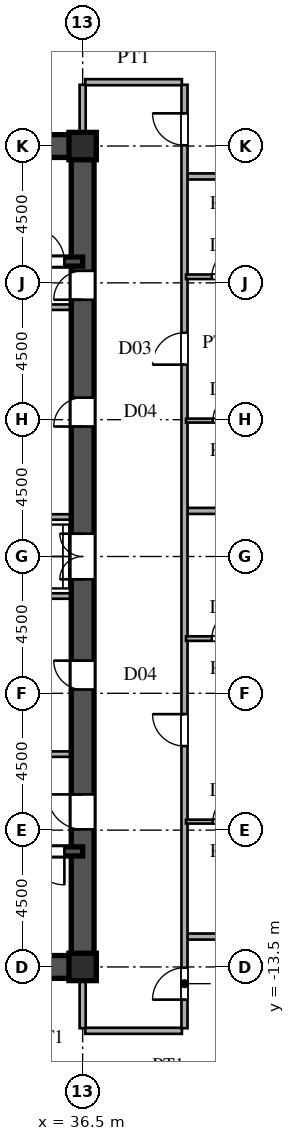
"""IFC4 building model, lengths in metres.
Left out: names, types, materials, properties, quantities, classifications, styles, units other than length and angle.
Written with IfcOpenShell. Run it as: python <this file> out.ifc"""

import sys

from ifc_helpers import new_model, si_unit, direction, frame, frame_2d, origin, origin_2d, place, context, subcontext, project, spatial, rectangle, i_section, extrude, source, transform, mapped, element, fill, save


model = new_model("IFC4")
c1 = context("Model", 3, precision=1e-05, world=origin(), true_north=direction((0.0, 1.0)))
c2 = subcontext(c1, "Body", "Model", "MODEL_VIEW")
j1 = project(units=[si_unit("LENGTHUNIT", "METRE"), si_unit("PLANEANGLEUNIT", "RADIAN")], contexts=[c1])
p1 = place(None, origin())
s1 = spatial("IfcSite", under=j1, at=p1, CompositionType="ELEMENT")
p2 = place(p1, origin())
s2 = spatial("IfcBuilding", under=s1, at=p2, CompositionType="ELEMENT")
p3 = place(p2, frame((0.0, 0.0, 44.1)))
s3 = spatial("IfcBuildingStorey", under=s2, at=p3, CompositionType="ELEMENT", Elevation=44.1)
m1 = source(origin(), c2, "Body", "SweptSolid", [
    extrude(i_section(OverallWidth=0.9, OverallDepth=0.9, WebThickness=0.036, FlangeThickness=0.055, at=origin_2d()), origin(), (0.0, 0.0, 1.0), 3.6),
])
for number, where, z_axis, x_axis in (
    (1, (36.5, -13.5, 0.0), (0.0, 0.0, 1.0), (1.0, 0.0, 0.0)),
    (2, (36.5, 13.5, 0.0), (0.0, 0.0, 1.0), (1.0, 0.0, 0.0)),
):
    element("IfcColumn", number, at=place(p3, frame(where, z_axis=z_axis, x_axis=x_axis)), inside=s3, PredefinedType="COLUMN", context=c2, shape_type="MappedRepresentation", body=[
        mapped(m1, transform((0.0, 0.0, 0.0), scale=1.0)),
    ])
for number, where, z_axis, x_axis in (
    (3, (27.5, -13.5, 0.0), (0.0, 0.0, 1.0), (1.0, 0.0, 0.0)),
    (4, (27.5, 13.5, 0.0), (0.0, 0.0, 1.0), (1.0, 0.0, 0.0)),
):
    element("IfcWall", number, at=place(p3, frame(where, z_axis=z_axis, x_axis=x_axis)), inside=s3, PredefinedType="SHEAR", context=c2, shape_type="SweptSolid", body=[
        extrude(rectangle(XDim=9.0, YDim=0.75, at=frame_2d((4.5, 0.0))), origin(), (0.0, 0.0, 1.0), 3.38),
    ])
p4 = place(p3, frame((36.5, -13.65, 0.0), z_axis=(0.0, 0.0, 1.0), x_axis=(0.0, 1.0, 0.0)))
e5 = element("IfcWall", 5, at=p4, inside=s3, PredefinedType="SHEAR", context=c2, shape_type="SweptSolid", body=[
    extrude(rectangle(XDim=7.15, YDim=0.75, at=frame_2d((3.575, 0.0))), origin(), (0.0, 0.0, 1.0), 3.38),
])
p5 = place(p4, frame((4.675, 0.0, 0.0)))
e6 = element("IfcOpeningElement", 6, at=p5, cuts=e5, PredefinedType="OPENING", context=c2, shape_type="SweptSolid", body=[
    extrude(rectangle(XDim=1.15, YDim=2.2, at=frame_2d((0.575, 1.1))), frame((0.0, 0.385, 0.0), z_axis=(0.0, -1.0, 0.0), x_axis=(1.0, 0.0, 0.0)), (0.0, 0.0, 1.0), 0.77),
])
p6 = place(p3, frame((36.5, -1.3, 0.0), z_axis=(0.0, 0.0, 1.0), x_axis=(0.0, 1.0, 0.0)))
e7 = element("IfcWall", 7, at=p6, inside=s3, PredefinedType="SHEAR", context=c2, shape_type="SweptSolid", body=[
    extrude(rectangle(XDim=2.6, YDim=0.75, at=frame_2d((1.3, 0.0))), origin(), (0.0, 0.0, 1.0), 3.38),
])
p7 = place(p6, frame((0.55, 0.0, 0.0)))
e8 = element("IfcOpeningElement", 8, at=p7, cuts=e7, PredefinedType="OPENING", context=c2, shape_type="SweptSolid", body=[
    extrude(rectangle(XDim=1.5, YDim=2.3, at=frame_2d((0.75, 1.15))), frame((0.0, 0.385, 0.0), z_axis=(0.0, -1.0, 0.0), x_axis=(1.0, 0.0, 0.0)), (0.0, 0.0, 1.0), 0.77),
])
p8 = place(p3, frame((36.5, 8.2, 0.0), z_axis=(0.0, 0.0, 1.0), x_axis=(0.0, 1.0, 0.0)))
e9 = element("IfcWall", 9, at=p8, inside=s3, PredefinedType="SHEAR", context=c2, shape_type="SweptSolid", body=[
    extrude(rectangle(XDim=5.45, YDim=0.75, at=frame_2d((2.725, 0.0))), origin(), (0.0, 0.0, 1.0), 3.38),
])
p9 = place(p8, frame((0.245, 0.0, 0.0)))
e10 = element("IfcOpeningElement", 10, at=p9, cuts=e9, PredefinedType="OPENING", context=c2, shape_type="SweptSolid", body=[
    extrude(rectangle(XDim=0.95, YDim=2.15, at=frame_2d((0.475, 1.075))), frame((0.0, 0.385, 0.0), z_axis=(0.0, -1.0, 0.0), x_axis=(1.0, 0.0, 0.0)), (0.0, 0.0, 1.0), 0.77),
])
p10 = place(p3, frame((36.5, -6.5, 0.0), z_axis=(0.0, 0.0, 1.0), x_axis=(0.0, 1.0, 0.0)))
e11 = element("IfcWall", 11, at=p10, inside=s3, PredefinedType="SHEAR", context=c2, shape_type="SweptSolid", body=[
    extrude(rectangle(XDim=5.2, YDim=0.75, at=frame_2d((2.6, 0.0))), origin(), (0.0, 0.0, 1.0), 3.38),
])
p11 = place(p10, frame((2.125, 0.0, 0.0)))
e12 = element("IfcOpeningElement", 12, at=p11, cuts=e11, PredefinedType="OPENING", context=c2, shape_type="SweptSolid", body=[
    extrude(rectangle(XDim=0.95, YDim=2.15, at=frame_2d((0.475, 1.075))), frame((0.0, 0.385, 0.0), z_axis=(0.0, -1.0, 0.0), x_axis=(1.0, 0.0, 0.0)), (0.0, 0.0, 1.0), 0.77),
])
p12 = place(p3, frame((36.5, 1.3, 0.0), z_axis=(0.0, 0.0, 1.0), x_axis=(0.0, 1.0, 0.0)))
e13 = element("IfcWall", 13, at=p12, inside=s3, PredefinedType="SHEAR", context=c2, shape_type="SweptSolid", body=[
    extrude(rectangle(XDim=6.9, YDim=0.75, at=frame_2d((3.45, 0.0))), origin(), (0.0, 0.0, 1.0), 3.38),
])
p13 = place(p12, frame((2.975, 0.0, 0.0)))
e14 = element("IfcOpeningElement", 14, at=p13, cuts=e13, PredefinedType="OPENING", context=c2, shape_type="SweptSolid", body=[
    extrude(rectangle(XDim=0.95, YDim=2.15, at=frame_2d((0.475, 1.075))), frame((0.0, 0.385, 0.0), z_axis=(0.0, -1.0, 0.0), x_axis=(1.0, 0.0, 0.0)), (0.0, 0.0, 1.0), 0.77),
])
p14 = place(p3, frame((27.5, -9.7, 0.0), z_axis=(0.0, 0.0, 1.0), x_axis=(1.0, 0.0, 0.0)))
e15 = element("IfcWall", 15, at=p14, inside=s3, PredefinedType="SHEAR", context=c2, shape_type="SweptSolid", body=[
    extrude(rectangle(XDim=9.0, YDim=0.3, at=frame_2d((4.5, 0.0))), origin(), (0.0, 0.0, 1.0), 3.38),
])
p15 = place(p14, frame((7.3, 0.0, 0.0)))
e16 = element("IfcOpeningElement", 16, at=p15, cuts=e15, PredefinedType="OPENING", context=c2, shape_type="SweptSolid", body=[
    extrude(rectangle(XDim=1.1, YDim=2.2, at=frame_2d((0.55, 1.1))), frame((0.0, 0.16, 0.0), z_axis=(0.0, -1.0, 0.0), x_axis=(1.0, 0.0, 0.0)), (0.0, 0.0, 1.0), 0.32),
])
p16 = place(p3, frame((27.5, 9.7, 0.0), z_axis=(0.0, 0.0, 1.0), x_axis=(1.0, 0.0, 0.0)))
e17 = element("IfcWall", 17, at=p16, inside=s3, PredefinedType="SHEAR", context=c2, shape_type="SweptSolid", body=[
    extrude(rectangle(XDim=9.0, YDim=0.3, at=frame_2d((4.5, 0.0))), origin(), (0.0, 0.0, 1.0), 3.38),
])
p17 = place(p16, frame((7.3, 0.0, 0.0)))
e18 = element("IfcOpeningElement", 18, at=p17, cuts=e17, PredefinedType="OPENING", context=c2, shape_type="SweptSolid", body=[
    extrude(rectangle(XDim=1.1, YDim=2.2, at=frame_2d((0.55, 1.1))), frame((0.0, 0.16, 0.0), z_axis=(0.0, -1.0, 0.0), x_axis=(1.0, 0.0, 0.0)), (0.0, 0.0, 1.0), 0.32),
])
for number, where, z_axis, x_axis in (
    (19, (30.45, -6.5, 0.0), (0.0, 0.0, 1.0), (1.0, 0.0, 0.0)),
    (20, (30.45, 8.2, 0.0), (0.0, 0.0, 1.0), (1.0, 0.0, 0.0)),
):
    element("IfcWall", number, at=place(p3, frame(where, z_axis=z_axis, x_axis=x_axis)), inside=s3, PredefinedType="PARTITIONING", context=c2, shape_type="SweptSolid", body=[
        extrude(rectangle(XDim=5.7, YDim=0.18, at=frame_2d((2.85, 0.0))), origin(), (0.0, 0.0, 1.0), 3.38),
    ])
for number, where, z_axis, x_axis in (
    (21, (33.2, -1.3, 0.0), (0.0, 0.0, 1.0), (1.0, 0.0, 0.0)),
    (22, (33.2, 1.3, 0.0), (0.0, 0.0, 1.0), (1.0, 0.0, 0.0)),
):
    element("IfcWall", number, at=place(p3, frame(where, z_axis=z_axis, x_axis=x_axis)), inside=s3, PredefinedType="PARTITIONING", context=c2, shape_type="SweptSolid", body=[
        extrude(rectangle(XDim=2.95, YDim=0.18, at=frame_2d((1.475, 0.0))), origin(), (0.0, 0.0, 1.0), 3.38),
    ])
p18 = place(p3, frame((36.585, -15.6, 0.0), z_axis=(0.0, 0.0, 1.0), x_axis=(1.0, 0.0, 0.0)))
e23 = element("IfcWall", 23, at=p18, inside=s3, PredefinedType="PARTITIONING", context=c2, shape_type="SweptSolid", body=[
    extrude(rectangle(XDim=3.18, YDim=0.2, at=frame_2d((1.59, 0.0))), origin(), (0.0, 0.0, 1.0), 3.38),
])
p19 = place(p3, frame((39.93, -12.5, 0.0), z_axis=(0.0, 0.0, 1.0), x_axis=(1.0, 0.0, 0.0)))
e24 = element("IfcWall", 24, at=p19, inside=s3, PredefinedType="PARTITIONING", context=c2, shape_type="SweptSolid", body=[
    extrude(rectangle(XDim=26.407, YDim=0.2, at=frame_2d((13.204, 0.0))), origin(), (0.0, 0.0, 1.0), 3.38),
])
p20 = place(p3, frame((39.9, -8.72, 0.0), z_axis=(0.0, 0.0, 1.0), x_axis=(1.0, 0.0, 0.0)))
e25 = element("IfcWall", 25, at=p20, inside=s3, PredefinedType="PARTITIONING", context=c2, shape_type="SweptSolid", body=[
    extrude(rectangle(XDim=2.65, YDim=0.13, at=frame_2d((1.325, 0.0))), origin(), (0.0, 0.0, 1.0), 3.38),
])
p21 = place(p20, frame((0.885, 0.0, 0.0)))
e26 = element("IfcOpeningElement", 26, at=p21, cuts=e25, PredefinedType="OPENING", context=c2, shape_type="SweptSolid", body=[
    extrude(rectangle(XDim=0.88, YDim=2.1, at=frame_2d((0.44, 1.05))), frame((0.0, 0.075, 0.0), z_axis=(0.0, -1.0, 0.0), x_axis=(1.0, 0.0, 0.0)), (0.0, 0.0, 1.0), 0.15),
])
p22 = place(p3, frame((39.9, -2.7, 0.0), z_axis=(0.0, 0.0, 1.0), x_axis=(1.0, 0.0, 0.0)))
e27 = element("IfcWall", 27, at=p22, inside=s3, PredefinedType="PARTITIONING", context=c2, shape_type="SweptSolid", body=[
    extrude(rectangle(XDim=2.65, YDim=0.15, at=frame_2d((1.325, 0.0))), origin(), (0.0, 0.0, 1.0), 3.38),
])
p23 = place(p22, frame((0.85, 0.0, 0.0)))
e28 = element("IfcOpeningElement", 28, at=p23, cuts=e27, PredefinedType="OPENING", context=c2, shape_type="SweptSolid", body=[
    extrude(rectangle(XDim=0.95, YDim=2.15, at=frame_2d((0.475, 1.075))), frame((0.0, 0.085, 0.0), z_axis=(0.0, -1.0, 0.0), x_axis=(1.0, 0.0, 0.0)), (0.0, 0.0, 1.0), 0.17),
])
p24 = place(p3, frame((39.93, 1.5, 0.0), z_axis=(0.0, 0.0, 1.0), x_axis=(1.0, 0.0, 0.0)))
e29 = element("IfcWall", 29, at=p24, inside=s3, PredefinedType="PARTITIONING", context=c2, shape_type="SweptSolid", body=[
    extrude(rectangle(XDim=32.575, YDim=0.2, at=frame_2d((16.288, 0.0))), origin(), (0.0, 0.0, 1.0), 3.38),
])
p25 = place(p3, frame((39.9, 4.47, 0.0), z_axis=(0.0, 0.0, 1.0), x_axis=(1.0, 0.0, 0.0)))
e30 = element("IfcWall", 30, at=p25, inside=s3, PredefinedType="PARTITIONING", context=c2, shape_type="SweptSolid", body=[
    extrude(rectangle(XDim=2.65, YDim=0.13, at=frame_2d((1.325, 0.0))), origin(), (0.0, 0.0, 1.0), 2.68),
])
p26 = place(p25, frame((0.885, 0.0, 0.0)))
e31 = element("IfcOpeningElement", 31, at=p26, cuts=e30, PredefinedType="OPENING", context=c2, shape_type="SweptSolid", body=[
    extrude(rectangle(XDim=0.88, YDim=2.1, at=frame_2d((0.44, 1.05))), frame((0.0, 0.075, 0.0), z_axis=(0.0, -1.0, 0.0), x_axis=(1.0, 0.0, 0.0)), (0.0, 0.0, 1.0), 0.15),
])
p27 = place(p3, frame((39.9, 9.2, 0.0), z_axis=(0.0, 0.0, 1.0), x_axis=(1.0, 0.0, 0.0)))
e32 = element("IfcWall", 32, at=p27, inside=s3, PredefinedType="PARTITIONING", context=c2, shape_type="SweptSolid", body=[
    extrude(rectangle(XDim=2.65, YDim=0.15, at=frame_2d((1.325, 0.0))), origin(), (0.0, 0.0, 1.0), 3.38),
])
p28 = place(p27, frame((0.85, 0.0, 0.0)))
e33 = element("IfcOpeningElement", 33, at=p28, cuts=e32, PredefinedType="OPENING", context=c2, shape_type="SweptSolid", body=[
    extrude(rectangle(XDim=0.95, YDim=2.15, at=frame_2d((0.475, 1.075))), frame((0.0, 0.085, 0.0), z_axis=(0.0, -1.0, 0.0), x_axis=(1.0, 0.0, 0.0)), (0.0, 0.0, 1.0), 0.17),
])
p29 = place(p3, frame((39.93, 12.5, 0.0), z_axis=(0.0, 0.0, 1.0), x_axis=(1.0, 0.0, 0.0)))
e34 = element("IfcWall", 34, at=p29, inside=s3, PredefinedType="PARTITIONING", context=c2, shape_type="SweptSolid", body=[
    extrude(rectangle(XDim=26.407, YDim=0.2, at=frame_2d((13.204, 0.0))), origin(), (0.0, 0.0, 1.0), 3.38),
])
p30 = place(p3, frame((36.585, 15.6, 0.0), z_axis=(0.0, 0.0, 1.0), x_axis=(1.0, 0.0, 0.0)))
e35 = element("IfcWall", 35, at=p30, inside=s3, PredefinedType="PARTITIONING", context=c2, shape_type="SweptSolid", body=[
    extrude(rectangle(XDim=3.18, YDim=0.2, at=frame_2d((1.59, 0.0))), origin(), (0.0, 0.0, 1.0), 3.38),
])
for number, where, z_axis, x_axis in (
    (36, (36.5, -15.515, 0.0), (0.0, 0.0, 1.0), (0.0, 1.0, 0.0)),
    (37, (36.5, 13.88, 0.0), (0.0, 0.0, 1.0), (0.0, 1.0, 0.0)),
):
    element("IfcWall", number, at=place(p3, frame(where, z_axis=z_axis, x_axis=x_axis)), inside=s3, PredefinedType="PARTITIONING", context=c2, shape_type="SweptSolid", body=[
        extrude(rectangle(XDim=1.635, YDim=0.2, at=frame_2d((0.817, 0.0))), origin(), (0.0, 0.0, 1.0), 2.68),
    ])
p31 = place(p3, frame((39.85, -15.515, 0.0), z_axis=(0.0, 0.0, 1.0), x_axis=(0.0, 1.0, 0.0)))
e38 = element("IfcWall", 38, at=p31, inside=s3, PredefinedType="PARTITIONING", context=c2, shape_type="SweptSolid", body=[
    extrude(rectangle(XDim=31.03, YDim=0.2, at=frame_2d((15.515, 0.0))), origin(), (0.0, 0.0, 1.0), 3.38),
])
p32 = place(p31, frame((0.94, 0.0, 0.0)))
e39 = element("IfcOpeningElement", 39, at=p32, cuts=e38, PredefinedType="OPENING", context=c2, shape_type="SweptSolid", body=[
    extrude(rectangle(XDim=1.05, YDim=2.25, at=frame_2d((0.525, 1.125))), frame((0.0, 0.11, 0.0), z_axis=(0.0, -1.0, 0.0), x_axis=(1.0, 0.0, 0.0)), (0.0, 0.0, 1.0), 0.22),
])
p33 = place(p31, frame((9.28, 0.0, 0.0)))
e40 = element("IfcOpeningElement", 40, at=p33, cuts=e38, PredefinedType="OPENING", context=c2, shape_type="SweptSolid", body=[
    extrude(rectangle(XDim=1.05, YDim=2.25, at=frame_2d((0.525, 1.125))), frame((0.0, 0.11, 0.0), z_axis=(0.0, -1.0, 0.0), x_axis=(1.0, 0.0, 0.0)), (0.0, 0.0, 1.0), 0.22),
])
p34 = place(p31, frame((21.825, 0.0, 0.0)))
e41 = element("IfcOpeningElement", 41, at=p34, cuts=e38, PredefinedType="OPENING", context=c2, shape_type="SweptSolid", body=[
    extrude(rectangle(XDim=1.05, YDim=2.25, at=frame_2d((0.525, 1.125))), frame((0.0, 0.11, 0.0), z_axis=(0.0, -1.0, 0.0), x_axis=(1.0, 0.0, 0.0)), (0.0, 0.0, 1.0), 0.22),
])
p35 = place(p31, frame((29.04, 0.0, 0.0)))
e42 = element("IfcOpeningElement", 42, at=p35, cuts=e38, PredefinedType="OPENING", context=c2, shape_type="SweptSolid", body=[
    extrude(rectangle(XDim=1.05, YDim=2.25, at=frame_2d((0.525, 1.125))), frame((0.0, 0.11, 0.0), z_axis=(0.0, -1.0, 0.0), x_axis=(1.0, 0.0, 0.0)), (0.0, 0.0, 1.0), 0.22),
])
m2 = source(origin(), c2, "Body", "SweptSolid", [
    extrude(rectangle(XDim=1.15, YDim=2.2, at=frame_2d((0.575, 1.1))), frame((0.0, 0.025, 0.0), z_axis=(0.0, -1.0, 0.0), x_axis=(1.0, 0.0, 0.0)), (0.0, 0.0, 1.0), 0.05),
])
p36 = place(p5, origin())
e43 = element("IfcDoor", 43, at=p36, inside=s3, OperationType="SINGLE_SWING_RIGHT", PredefinedType="DOOR", context=c2, shape_type="MappedRepresentation", body=[
    mapped(m2, transform((0.0, 0.0, 0.0), scale=1.0)),
])
fill(e6, e43)
m3 = source(origin(), c2, "Body", "SweptSolid", [
    extrude(rectangle(XDim=1.5, YDim=2.3, at=frame_2d((0.75, 1.15))), frame((0.0, 0.025, 0.0), z_axis=(0.0, -1.0, 0.0), x_axis=(1.0, 0.0, 0.0)), (0.0, 0.0, 1.0), 0.05),
])
p37 = place(p7, origin())
e44 = element("IfcDoor", 44, at=p37, inside=s3, OperationType="DOUBLE_SWING_LEFT", PredefinedType="DOOR", context=c2, shape_type="MappedRepresentation", body=[
    mapped(m3, transform((0.0, 0.0, 0.0), scale=1.0)),
])
fill(e8, e44)
m4 = source(origin(), c2, "Body", "SweptSolid", [
    extrude(rectangle(XDim=0.95, YDim=2.15, at=frame_2d((0.475, 1.075))), frame((0.0, 0.025, 0.0), z_axis=(0.0, -1.0, 0.0), x_axis=(1.0, 0.0, 0.0)), (0.0, 0.0, 1.0), 0.05),
])
p38 = place(p9, origin())
e45 = element("IfcDoor", 45, at=p38, inside=s3, OperationType="SINGLE_SWING_LEFT", PredefinedType="DOOR", context=c2, shape_type="MappedRepresentation", body=[
    mapped(m4, transform((0.0, 0.0, 0.0), scale=1.0)),
])
fill(e10, e45)
p39 = place(p11, origin())
e46 = element("IfcDoor", 46, at=p39, inside=s3, OperationType="SINGLE_SWING_RIGHT", PredefinedType="DOOR", context=c2, shape_type="MappedRepresentation", body=[
    mapped(m4, transform((0.0, 0.0, 0.0), scale=1.0)),
])
fill(e12, e46)
p40 = place(p13, origin())
e47 = element("IfcDoor", 47, at=p40, inside=s3, OperationType="SINGLE_SWING_LEFT", PredefinedType="DOOR", context=c2, shape_type="MappedRepresentation", body=[
    mapped(m4, transform((0.0, 0.0, 0.0), scale=1.0)),
])
fill(e14, e47)
m5 = source(origin(), c2, "Body", "SweptSolid", [
    extrude(rectangle(XDim=1.1, YDim=2.2, at=frame_2d((0.55, 1.1))), frame((0.0, 0.025, 0.0), z_axis=(0.0, -1.0, 0.0), x_axis=(1.0, 0.0, 0.0)), (0.0, 0.0, 1.0), 0.05),
])
p41 = place(p15, frame((1.1, 0.0, 0.0), z_axis=(0.0, 0.0, 1.0), x_axis=(-1.0, 0.0, 0.0)))
e48 = element("IfcDoor", 48, at=p41, inside=s3, OperationType="SINGLE_SWING_RIGHT", PredefinedType="DOOR", context=c2, shape_type="MappedRepresentation", body=[
    mapped(m5, transform((0.0, 0.0, 0.0), scale=1.0)),
])
fill(e16, e48)
p42 = place(p17, origin())
e49 = element("IfcDoor", 49, at=p42, inside=s3, OperationType="SINGLE_SWING_LEFT", PredefinedType="DOOR", context=c2, shape_type="MappedRepresentation", body=[
    mapped(m5, transform((0.0, 0.0, 0.0), scale=1.0)),
])
fill(e18, e49)
m6 = source(origin(), c2, "Body", "SweptSolid", [
    extrude(rectangle(XDim=0.88, YDim=2.1, at=frame_2d((0.44, 1.05))), frame((0.0, 0.025, 0.0), z_axis=(0.0, -1.0, 0.0), x_axis=(1.0, 0.0, 0.0)), (0.0, 0.0, 1.0), 0.05),
])
p43 = place(p21, origin())
e50 = element("IfcDoor", 50, at=p43, inside=s3, OperationType="SINGLE_SWING_RIGHT", PredefinedType="DOOR", context=c2, shape_type="MappedRepresentation", body=[
    mapped(m6, transform((0.0, 0.0, 0.0), scale=1.0)),
])
fill(e26, e50)
m7 = source(origin(), c2, "Body", "SweptSolid", [
    extrude(rectangle(XDim=0.95, YDim=2.15, at=frame_2d((0.475, 1.075))), frame((0.0, 0.025, 0.0), z_axis=(0.0, -1.0, 0.0), x_axis=(1.0, 0.0, 0.0)), (0.0, 0.0, 1.0), 0.05),
])
p44 = place(p23, origin())
e51 = element("IfcDoor", 51, at=p44, inside=s3, OperationType="SINGLE_SWING_RIGHT", PredefinedType="DOOR", context=c2, shape_type="MappedRepresentation", body=[
    mapped(m7, transform((0.0, 0.0, 0.0), scale=1.0)),
])
fill(e28, e51)
p45 = place(p26, origin())
e52 = element("IfcDoor", 52, at=p45, inside=s3, OperationType="SINGLE_SWING_RIGHT", PredefinedType="DOOR", context=c2, shape_type="MappedRepresentation", body=[
    mapped(m6, transform((0.0, 0.0, 0.0), scale=1.0)),
])
fill(e31, e52)
p46 = place(p28, origin())
e53 = element("IfcDoor", 53, at=p46, inside=s3, OperationType="SINGLE_SWING_RIGHT", PredefinedType="DOOR", context=c2, shape_type="MappedRepresentation", body=[
    mapped(m7, transform((0.0, 0.0, 0.0), scale=1.0)),
])
fill(e33, e53)
m8 = source(origin(), c2, "Body", "SweptSolid", [
    extrude(rectangle(XDim=1.05, YDim=2.25, at=frame_2d((0.525, 1.125))), frame((0.0, 0.025, 0.0), z_axis=(0.0, -1.0, 0.0), x_axis=(1.0, 0.0, 0.0)), (0.0, 0.0, 1.0), 0.05),
])
p47 = place(p32, origin())
e54 = element("IfcDoor", 54, at=p47, inside=s3, OperationType="SINGLE_SWING_LEFT", PredefinedType="DOOR", context=c2, shape_type="MappedRepresentation", body=[
    mapped(m8, transform((0.0, 0.0, 0.0), scale=1.0)),
])
fill(e39, e54)
p48 = place(p33, origin())
e55 = element("IfcDoor", 55, at=p48, inside=s3, OperationType="SINGLE_SWING_RIGHT", PredefinedType="DOOR", context=c2, shape_type="MappedRepresentation", body=[
    mapped(m8, transform((0.0, 0.0, 0.0), scale=1.0)),
])
fill(e40, e55)
p49 = place(p34, origin())
e56 = element("IfcDoor", 56, at=p49, inside=s3, OperationType="SINGLE_SWING_LEFT", PredefinedType="DOOR", context=c2, shape_type="MappedRepresentation", body=[
    mapped(m8, transform((0.0, 0.0, 0.0), scale=1.0)),
])
fill(e41, e56)
p50 = place(p35, origin())
e57 = element("IfcDoor", 57, at=p50, inside=s3, OperationType="SINGLE_SWING_RIGHT", PredefinedType="DOOR", context=c2, shape_type="MappedRepresentation", body=[
    mapped(m8, transform((0.0, 0.0, 0.0), scale=1.0)),
])
fill(e42, e57)
save(model, sys.argv[1])
